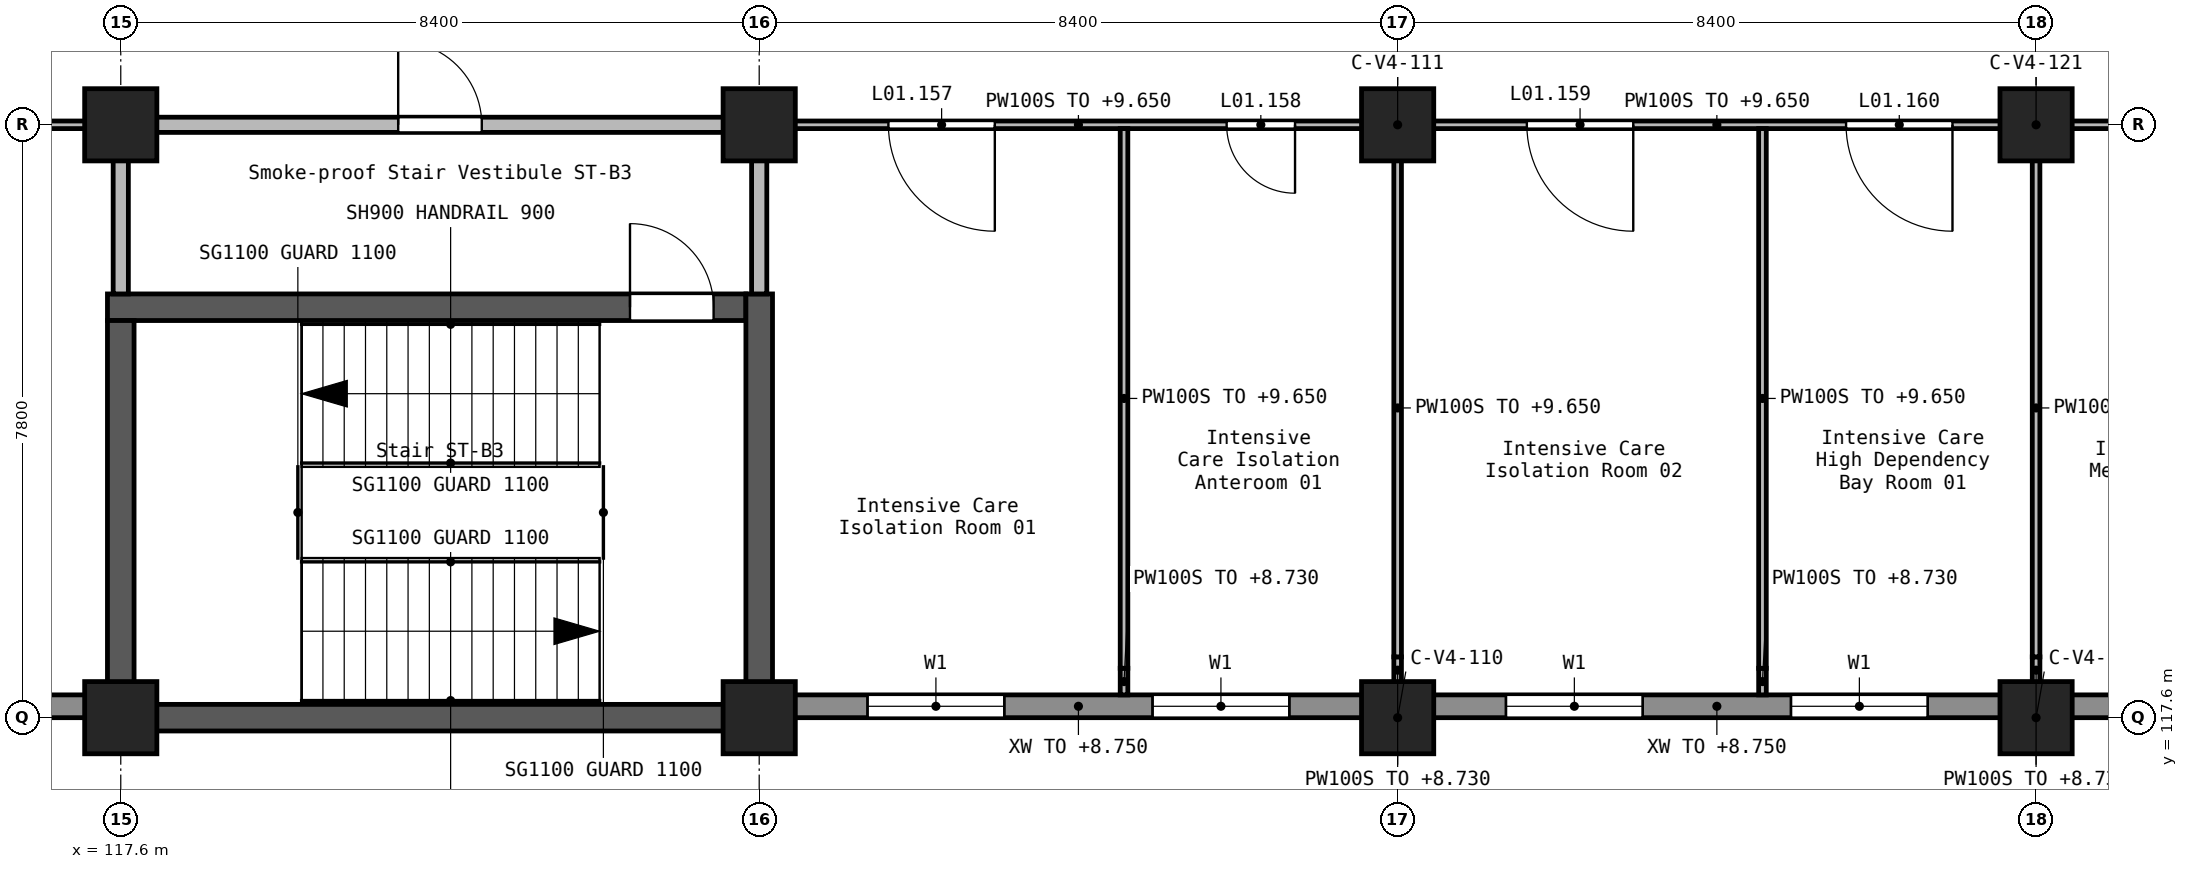
"""IFC4 building model, lengths in metres.
Left out: names, types, materials, properties, quantities, classifications, styles, units other than length and angle.
Written with IfcOpenShell. Run it as: python <this file> out.ifc"""

import sys

from ifc_helpers import new_model, si_unit, direction, frame, frame_2d, origin, origin_2d, place, context, subcontext, project, spatial, rectangle, extrude, element, fill, save


model = new_model("IFC4")
c1 = context("Model", 3, precision=1e-05, world=origin(), true_north=direction((0.0, 1.0)))
c2 = subcontext(c1, "Body", "Model", "MODEL_VIEW")
j1 = project(units=[si_unit("LENGTHUNIT", "METRE"), si_unit("PLANEANGLEUNIT", "RADIAN")], contexts=[c1])
p1 = place(None, origin())
s1 = spatial("IfcSite", under=j1, at=p1, CompositionType="ELEMENT")
p2 = place(p1, origin())
s2 = spatial("IfcBuilding", under=s1, at=p2, CompositionType="ELEMENT")
p3 = place(p2, frame((0.0, 0.0, 5.4)))
s3 = spatial("IfcBuildingStorey", under=s2, at=p3, CompositionType="ELEMENT", Elevation=5.4)
for number, where, z_axis, x_axis in (
    (1, (117.6, 117.6, 0.0), (0.0, 0.0, 1.0), (1.0, 0.0, 0.0)),
    (2, (117.6, 125.4, 0.0), (0.0, 0.0, 1.0), (1.0, 0.0, 0.0)),
    (3, (126.0, 117.6, 0.0), (0.0, 0.0, 1.0), (1.0, 0.0, 0.0)),
    (4, (126.0, 125.4, 0.0), (0.0, 0.0, 1.0), (1.0, 0.0, 0.0)),
    (5, (134.4, 117.6, 0.0), (0.0, 0.0, 1.0), (1.0, 0.0, 0.0)),
    (6, (134.4, 125.4, 0.0), (0.0, 0.0, 1.0), (1.0, 0.0, 0.0)),
    (7, (142.8, 117.6, 0.0), (0.0, 0.0, 1.0), (1.0, 0.0, 0.0)),
    (8, (142.8, 125.4, 0.0), (0.0, 0.0, 1.0), (1.0, 0.0, 0.0)),
):
    element("IfcColumn", number, at=place(p3, frame(where, z_axis=z_axis, x_axis=x_axis)), inside=s3, PredefinedType="COLUMN", context=c2, shape_type="SweptSolid", body=[
        extrude(rectangle(XDim=0.95, YDim=0.95, at=origin_2d()), origin(), (0.0, 0.0, 1.0), 4.5),
    ])
p4 = place(p3, frame((117.425, 123.0, 0.0), z_axis=(0.0, 0.0, 1.0), x_axis=(1.0, 0.0, 0.0)))
e9 = element("IfcWall", 9, at=p4, inside=s3, PredefinedType="SHEAR", context=c2, shape_type="SweptSolid", body=[
    extrude(rectangle(XDim=8.4, YDim=0.35, at=frame_2d((4.2, 0.0))), origin(), (0.0, 0.0, 1.0), 4.5),
])
p5 = place(p4, frame((6.875, 0.0, 0.0)))
e10 = element("IfcOpeningElement", 10, at=p5, cuts=e9, PredefinedType="OPENING", context=c2, shape_type="SweptSolid", body=[
    extrude(rectangle(XDim=1.1, YDim=2.1, at=frame_2d((0.55, 1.05))), frame((0.0, 0.185, 0.0), z_axis=(0.0, -1.0, 0.0), x_axis=(1.0, 0.0, 0.0)), (0.0, 0.0, 1.0), 0.37),
])
p6 = place(p3, frame((117.6, 117.425, 0.0), z_axis=(0.0, 0.0, 1.0), x_axis=(0.0, 1.0, 0.0)))
e11 = element("IfcWall", 11, at=p6, inside=s3, PredefinedType="SHEAR", context=c2, shape_type="SweptSolid", body=[
    extrude(rectangle(XDim=5.4, YDim=0.35, at=frame_2d((2.7, 0.0))), origin(), (0.0, 0.0, 1.0), 4.5),
])
p7 = place(p3, frame((117.775, 117.6, 0.0), z_axis=(0.0, 0.0, 1.0), x_axis=(1.0, 0.0, 0.0)))
e12 = element("IfcWall", 12, at=p7, inside=s3, PredefinedType="SHEAR", context=c2, shape_type="SweptSolid", body=[
    extrude(rectangle(XDim=8.05, YDim=0.35, at=frame_2d((4.025, 0.0))), origin(), (0.0, 0.0, 1.0), 4.5),
])
p8 = place(p3, frame((126.0, 117.425, 0.0), z_axis=(0.0, 0.0, 1.0), x_axis=(0.0, 1.0, 0.0)))
e13 = element("IfcWall", 13, at=p8, inside=s3, PredefinedType="SHEAR", context=c2, shape_type="SweptSolid", body=[
    extrude(rectangle(XDim=5.75, YDim=0.35, at=frame_2d((2.875, 0.0))), origin(), (0.0, 0.0, 1.0), 4.5),
])
p9 = place(p3, frame((109.65, 117.75, 0.0), z_axis=(0.0, 0.0, 1.0), x_axis=(1.0, 0.0, 0.0)))
e14 = element("IfcWall", 14, at=p9, inside=s3, PredefinedType="STANDARD", context=c2, shape_type="SweptSolid", body=[
    extrude(rectangle(XDim=7.5, YDim=0.3, at=frame_2d((3.75, 0.0))), origin(), (0.0, 0.0, 1.0), 3.35),
])
p10 = place(p9, frame((0.975, 0.0, 0.9)))
e15 = element("IfcOpeningElement", 15, at=p10, cuts=e14, PredefinedType="OPENING", context=c2, shape_type="SweptSolid", body=[
    extrude(rectangle(XDim=1.8, YDim=1.5, at=frame_2d((0.9, 0.75))), frame((0.0, 0.16, 0.0), z_axis=(0.0, -1.0, 0.0), x_axis=(1.0, 0.0, 0.0)), (0.0, 0.0, 1.0), 0.32),
])
p11 = place(p9, frame((4.725, 0.0, 0.9)))
e16 = element("IfcOpeningElement", 16, at=p11, cuts=e14, PredefinedType="OPENING", context=c2, shape_type="SweptSolid", body=[
    extrude(rectangle(XDim=1.8, YDim=1.5, at=frame_2d((0.9, 0.75))), frame((0.0, 0.16, 0.0), z_axis=(0.0, -1.0, 0.0), x_axis=(1.0, 0.0, 0.0)), (0.0, 0.0, 1.0), 0.32),
])
p12 = place(p3, frame((126.45, 117.75, 0.0), z_axis=(0.0, 0.0, 1.0), x_axis=(1.0, 0.0, 0.0)))
e17 = element("IfcWall", 17, at=p12, inside=s3, PredefinedType="STANDARD", context=c2, shape_type="SweptSolid", body=[
    extrude(rectangle(XDim=7.5, YDim=0.3, at=frame_2d((3.75, 0.0))), origin(), (0.0, 0.0, 1.0), 3.35),
])
p13 = place(p12, frame((0.975, 0.0, 0.9)))
e18 = element("IfcOpeningElement", 18, at=p13, cuts=e17, PredefinedType="OPENING", context=c2, shape_type="SweptSolid", body=[
    extrude(rectangle(XDim=1.8, YDim=1.5, at=frame_2d((0.9, 0.75))), frame((0.0, 0.16, 0.0), z_axis=(0.0, -1.0, 0.0), x_axis=(1.0, 0.0, 0.0)), (0.0, 0.0, 1.0), 0.32),
])
p14 = place(p12, frame((4.725, 0.0, 0.9)))
e19 = element("IfcOpeningElement", 19, at=p14, cuts=e17, PredefinedType="OPENING", context=c2, shape_type="SweptSolid", body=[
    extrude(rectangle(XDim=1.8, YDim=1.5, at=frame_2d((0.9, 0.75))), frame((0.0, 0.16, 0.0), z_axis=(0.0, -1.0, 0.0), x_axis=(1.0, 0.0, 0.0)), (0.0, 0.0, 1.0), 0.32),
])
p15 = place(p3, frame((134.85, 117.75, 0.0), z_axis=(0.0, 0.0, 1.0), x_axis=(1.0, 0.0, 0.0)))
e20 = element("IfcWall", 20, at=p15, inside=s3, PredefinedType="STANDARD", context=c2, shape_type="SweptSolid", body=[
    extrude(rectangle(XDim=7.5, YDim=0.3, at=frame_2d((3.75, 0.0))), origin(), (0.0, 0.0, 1.0), 3.35),
])
p16 = place(p15, frame((0.975, 0.0, 0.9)))
e21 = element("IfcOpeningElement", 21, at=p16, cuts=e20, PredefinedType="OPENING", context=c2, shape_type="SweptSolid", body=[
    extrude(rectangle(XDim=1.8, YDim=1.5, at=frame_2d((0.9, 0.75))), frame((0.0, 0.16, 0.0), z_axis=(0.0, -1.0, 0.0), x_axis=(1.0, 0.0, 0.0)), (0.0, 0.0, 1.0), 0.32),
])
p17 = place(p15, frame((4.725, 0.0, 0.9)))
e22 = element("IfcOpeningElement", 22, at=p17, cuts=e20, PredefinedType="OPENING", context=c2, shape_type="SweptSolid", body=[
    extrude(rectangle(XDim=1.8, YDim=1.5, at=frame_2d((0.9, 0.75))), frame((0.0, 0.16, 0.0), z_axis=(0.0, -1.0, 0.0), x_axis=(1.0, 0.0, 0.0)), (0.0, 0.0, 1.0), 0.32),
])
p18 = place(p3, frame((143.25, 117.75, 0.0), z_axis=(0.0, 0.0, 1.0), x_axis=(1.0, 0.0, 0.0)))
e23 = element("IfcWall", 23, at=p18, inside=s3, PredefinedType="STANDARD", context=c2, shape_type="SweptSolid", body=[
    extrude(rectangle(XDim=7.5, YDim=0.3, at=frame_2d((3.75, 0.0))), origin(), (0.0, 0.0, 1.0), 3.35),
])
p19 = place(p18, frame((0.975, 0.0, 0.9)))
e24 = element("IfcOpeningElement", 24, at=p19, cuts=e23, PredefinedType="OPENING", context=c2, shape_type="SweptSolid", body=[
    extrude(rectangle(XDim=1.8, YDim=1.5, at=frame_2d((0.9, 0.75))), frame((0.0, 0.16, 0.0), z_axis=(0.0, -1.0, 0.0), x_axis=(1.0, 0.0, 0.0)), (0.0, 0.0, 1.0), 0.32),
])
p20 = place(p18, frame((4.725, 0.0, 0.9)))
e25 = element("IfcOpeningElement", 25, at=p20, cuts=e23, PredefinedType="OPENING", context=c2, shape_type="SweptSolid", body=[
    extrude(rectangle(XDim=1.8, YDim=1.5, at=frame_2d((0.9, 0.75))), frame((0.0, 0.16, 0.0), z_axis=(0.0, -1.0, 0.0), x_axis=(1.0, 0.0, 0.0)), (0.0, 0.0, 1.0), 0.32),
])
p21 = place(p3, frame((118.05, 125.4, 0.0), z_axis=(0.0, 0.0, 1.0), x_axis=(1.0, 0.0, 0.0)))
e26 = element("IfcWall", 26, at=p21, inside=s3, PredefinedType="SOLIDWALL", context=c2, shape_type="SweptSolid", body=[
    extrude(rectangle(XDim=7.5, YDim=0.2, at=frame_2d((3.75, 0.0))), origin(), (0.0, 0.0, 1.0), 4.25),
])
p22 = place(p21, frame((3.2, 0.0, 0.0)))
e27 = element("IfcOpeningElement", 27, at=p22, cuts=e26, PredefinedType="OPENING", context=c2, shape_type="SweptSolid", body=[
    extrude(rectangle(XDim=1.1, YDim=2.1, at=frame_2d((0.55, 1.05))), frame((0.0, 0.11, 0.0), z_axis=(0.0, -1.0, 0.0), x_axis=(1.0, 0.0, 0.0)), (0.0, 0.0, 1.0), 0.22),
])
for number, where, z_axis, x_axis in (
    (28, (117.6, 123.175, 0.0), (0.0, 0.0, 1.0), (0.0, 1.0, 0.0)),
    (29, (126.0, 123.175, 0.0), (0.0, 0.0, 1.0), (0.0, 1.0, 0.0)),
):
    element("IfcWall", number, at=place(p3, frame(where, z_axis=z_axis, x_axis=x_axis)), inside=s3, PredefinedType="SOLIDWALL", context=c2, shape_type="SweptSolid", body=[
        extrude(rectangle(XDim=1.775, YDim=0.2, at=frame_2d((0.887, 0.0))), origin(), (0.0, 0.0, 1.0), 4.25),
    ])
p23 = place(p3, frame((150.75, 125.4, 0.0), z_axis=(0.0, 0.0, 1.0), x_axis=(-1.0, 0.0, 0.0)))
e30 = element("IfcWall", 30, at=p23, inside=s3, PredefinedType="PARTITIONING", context=c2, shape_type="SweptSolid", body=[
    extrude(rectangle(XDim=7.5, YDim=0.1, at=frame_2d((3.75, 0.0))), origin(), (0.0, 0.0, 1.0), 4.25),
])
p24 = place(p23, frame((5.7, 0.0, 0.0)))
e31 = element("IfcOpeningElement", 31, at=p24, cuts=e30, PredefinedType="OPENING", context=c2, shape_type="SweptSolid", body=[
    extrude(rectangle(XDim=0.9, YDim=2.1, at=frame_2d((0.45, 1.05))), frame((0.0, 0.06, 0.0), z_axis=(0.0, -1.0, 0.0), x_axis=(1.0, 0.0, 0.0)), (0.0, 0.0, 1.0), 0.12),
])
p25 = place(p23, frame((1.25, 0.0, 0.0)))
e32 = element("IfcOpeningElement", 32, at=p25, cuts=e30, PredefinedType="OPENING", context=c2, shape_type="SweptSolid", body=[
    extrude(rectangle(XDim=1.4, YDim=2.1, at=frame_2d((0.7, 1.05))), frame((0.0, 0.06, 0.0), z_axis=(0.0, -1.0, 0.0), x_axis=(1.0, 0.0, 0.0)), (0.0, 0.0, 1.0), 0.12),
])
p26 = place(p3, frame((142.35, 125.4, 0.0), z_axis=(0.0, 0.0, 1.0), x_axis=(-1.0, 0.0, 0.0)))
e33 = element("IfcWall", 33, at=p26, inside=s3, PredefinedType="PARTITIONING", context=c2, shape_type="SweptSolid", body=[
    extrude(rectangle(XDim=7.5, YDim=0.1, at=frame_2d((3.75, 0.0))), origin(), (0.0, 0.0, 1.0), 4.25),
])
p27 = place(p26, frame((4.85, 0.0, 0.0)))
e34 = element("IfcOpeningElement", 34, at=p27, cuts=e33, PredefinedType="OPENING", context=c2, shape_type="SweptSolid", body=[
    extrude(rectangle(XDim=1.4, YDim=2.1, at=frame_2d((0.7, 1.05))), frame((0.0, 0.06, 0.0), z_axis=(0.0, -1.0, 0.0), x_axis=(1.0, 0.0, 0.0)), (0.0, 0.0, 1.0), 0.12),
])
p28 = place(p26, frame((0.65, 0.0, 0.0)))
e35 = element("IfcOpeningElement", 35, at=p28, cuts=e33, PredefinedType="OPENING", context=c2, shape_type="SweptSolid", body=[
    extrude(rectangle(XDim=1.4, YDim=2.1, at=frame_2d((0.7, 1.05))), frame((0.0, 0.06, 0.0), z_axis=(0.0, -1.0, 0.0), x_axis=(1.0, 0.0, 0.0)), (0.0, 0.0, 1.0), 0.12),
])
p29 = place(p3, frame((133.95, 125.4, 0.0), z_axis=(0.0, 0.0, 1.0), x_axis=(-1.0, 0.0, 0.0)))
e36 = element("IfcWall", 36, at=p29, inside=s3, PredefinedType="PARTITIONING", context=c2, shape_type="SweptSolid", body=[
    extrude(rectangle(XDim=7.5, YDim=0.1, at=frame_2d((3.75, 0.0))), origin(), (0.0, 0.0, 1.0), 4.25),
])
p30 = place(p29, frame((4.85, 0.0, 0.0)))
e37 = element("IfcOpeningElement", 37, at=p30, cuts=e36, PredefinedType="OPENING", context=c2, shape_type="SweptSolid", body=[
    extrude(rectangle(XDim=1.4, YDim=2.1, at=frame_2d((0.7, 1.05))), frame((0.0, 0.06, 0.0), z_axis=(0.0, -1.0, 0.0), x_axis=(1.0, 0.0, 0.0)), (0.0, 0.0, 1.0), 0.12),
])
p31 = place(p29, frame((0.9, 0.0, 0.0)))
e38 = element("IfcOpeningElement", 38, at=p31, cuts=e36, PredefinedType="OPENING", context=c2, shape_type="SweptSolid", body=[
    extrude(rectangle(XDim=0.9, YDim=2.1, at=frame_2d((0.45, 1.05))), frame((0.0, 0.06, 0.0), z_axis=(0.0, -1.0, 0.0), x_axis=(1.0, 0.0, 0.0)), (0.0, 0.0, 1.0), 0.12),
])
p32 = place(p3, frame((117.15, 125.4, 0.0), z_axis=(0.0, 0.0, 1.0), x_axis=(-1.0, 0.0, 0.0)))
e39 = element("IfcWall", 39, at=p32, inside=s3, PredefinedType="PARTITIONING", context=c2, shape_type="SweptSolid", body=[
    extrude(rectangle(XDim=7.5, YDim=0.1, at=frame_2d((3.75, 0.0))), origin(), (0.0, 0.0, 1.0), 4.25),
])
p33 = place(p32, frame((5.701, 0.0, 0.0)))
e40 = element("IfcOpeningElement", 40, at=p33, cuts=e39, PredefinedType="OPENING", context=c2, shape_type="SweptSolid", body=[
    extrude(rectangle(XDim=0.9, YDim=2.1, at=frame_2d((0.45, 1.05))), frame((0.0, 0.06, 0.0), z_axis=(0.0, -1.0, 0.0), x_axis=(1.0, 0.0, 0.0)), (0.0, 0.0, 1.0), 0.12),
])
p34 = place(p32, frame((1.252, 0.0, 0.0)))
e41 = element("IfcOpeningElement", 41, at=p34, cuts=e39, PredefinedType="OPENING", context=c2, shape_type="SweptSolid", body=[
    extrude(rectangle(XDim=1.4, YDim=2.1, at=frame_2d((0.7, 1.05))), frame((0.0, 0.06, 0.0), z_axis=(0.0, -1.0, 0.0), x_axis=(1.0, 0.0, 0.0)), (0.0, 0.0, 1.0), 0.12),
])
p35 = place(p3, frame((130.8, 117.9, 0.0), z_axis=(0.0, 0.0, 1.0), x_axis=(0.0, 1.0, 0.0)))
e42 = element("IfcWall", 42, at=p35, inside=s3, PredefinedType="PARTITIONING", context=c2, shape_type="SweptSolid", body=[
    extrude(rectangle(XDim=0.35, YDim=0.1, at=frame_2d((0.175, 0.0))), origin(), (0.0, 0.0, 1.0), 3.33),
])
p36 = place(p3, frame((130.8, 118.25, 0.0), z_axis=(0.0, 0.0, 1.0), x_axis=(0.0, 1.0, 0.0)))
e43 = element("IfcWall", 43, at=p36, inside=s3, PredefinedType="PARTITIONING", context=c2, shape_type="SweptSolid", body=[
    extrude(rectangle(XDim=7.1, YDim=0.1, at=frame_2d((3.55, 0.0))), origin(), (0.0, 0.0, 1.0), 4.25),
])
p37 = place(p3, frame((134.4, 118.05, 0.0), z_axis=(0.0, 0.0, 1.0), x_axis=(0.0, 1.0, 0.0)))
e44 = element("IfcWall", 44, at=p37, inside=s3, PredefinedType="PARTITIONING", context=c2, shape_type="SweptSolid", body=[
    extrude(rectangle(XDim=0.35, YDim=0.1, at=frame_2d((0.175, 0.0))), origin(), (0.0, 0.0, 1.0), 3.33),
])
p38 = place(p3, frame((134.4, 118.4, 0.0), z_axis=(0.0, 0.0, 1.0), x_axis=(0.0, 1.0, 0.0)))
e45 = element("IfcWall", 45, at=p38, inside=s3, PredefinedType="PARTITIONING", context=c2, shape_type="SweptSolid", body=[
    extrude(rectangle(XDim=6.55, YDim=0.1, at=frame_2d((3.275, 0.0))), origin(), (0.0, 0.0, 1.0), 4.25),
])
p39 = place(p3, frame((139.2, 117.9, 0.0), z_axis=(0.0, 0.0, 1.0), x_axis=(0.0, 1.0, 0.0)))
e46 = element("IfcWall", 46, at=p39, inside=s3, PredefinedType="PARTITIONING", context=c2, shape_type="SweptSolid", body=[
    extrude(rectangle(XDim=0.35, YDim=0.1, at=frame_2d((0.175, 0.0))), origin(), (0.0, 0.0, 1.0), 3.33),
])
p40 = place(p3, frame((139.2, 118.25, 0.0), z_axis=(0.0, 0.0, 1.0), x_axis=(0.0, 1.0, 0.0)))
e47 = element("IfcWall", 47, at=p40, inside=s3, PredefinedType="PARTITIONING", context=c2, shape_type="SweptSolid", body=[
    extrude(rectangle(XDim=7.1, YDim=0.1, at=frame_2d((3.55, 0.0))), origin(), (0.0, 0.0, 1.0), 4.25),
])
p41 = place(p3, frame((142.8, 118.05, 0.0), z_axis=(0.0, 0.0, 1.0), x_axis=(0.0, 1.0, 0.0)))
e48 = element("IfcWall", 48, at=p41, inside=s3, PredefinedType="PARTITIONING", context=c2, shape_type="SweptSolid", body=[
    extrude(rectangle(XDim=0.35, YDim=0.1, at=frame_2d((0.175, 0.0))), origin(), (0.0, 0.0, 1.0), 3.33),
])
p42 = place(p3, frame((142.8, 118.4, 0.0), z_axis=(0.0, 0.0, 1.0), x_axis=(0.0, 1.0, 0.0)))
e49 = element("IfcWall", 49, at=p42, inside=s3, PredefinedType="PARTITIONING", context=c2, shape_type="SweptSolid", body=[
    extrude(rectangle(XDim=6.55, YDim=0.1, at=frame_2d((3.275, 0.0))), origin(), (0.0, 0.0, 1.0), 4.25),
])
p43 = place(p13, origin())
e50 = element("IfcWindow", 50, at=p43, inside=s3, PartitioningType="SINGLE_PANEL", PredefinedType="WINDOW", context=c2, shape_type="SweptSolid", body=[
    extrude(rectangle(XDim=1.8, YDim=1.5, at=frame_2d((0.9, 0.75))), frame((0.0, 0.03, 0.0), z_axis=(0.0, -1.0, 0.0), x_axis=(1.0, 0.0, 0.0)), (0.0, 0.0, 1.0), 0.06),
])
fill(e18, e50)
p44 = place(p14, origin())
e51 = element("IfcWindow", 51, at=p44, inside=s3, PartitioningType="SINGLE_PANEL", PredefinedType="WINDOW", context=c2, shape_type="SweptSolid", body=[
    extrude(rectangle(XDim=1.8, YDim=1.5, at=frame_2d((0.9, 0.75))), frame((0.0, 0.03, 0.0), z_axis=(0.0, -1.0, 0.0), x_axis=(1.0, 0.0, 0.0)), (0.0, 0.0, 1.0), 0.06),
])
fill(e19, e51)
p45 = place(p16, origin())
e52 = element("IfcWindow", 52, at=p45, inside=s3, PartitioningType="SINGLE_PANEL", PredefinedType="WINDOW", context=c2, shape_type="SweptSolid", body=[
    extrude(rectangle(XDim=1.8, YDim=1.5, at=frame_2d((0.9, 0.75))), frame((0.0, 0.03, 0.0), z_axis=(0.0, -1.0, 0.0), x_axis=(1.0, 0.0, 0.0)), (0.0, 0.0, 1.0), 0.06),
])
fill(e21, e52)
p46 = place(p17, origin())
e53 = element("IfcWindow", 53, at=p46, inside=s3, PartitioningType="SINGLE_PANEL", PredefinedType="WINDOW", context=c2, shape_type="SweptSolid", body=[
    extrude(rectangle(XDim=1.8, YDim=1.5, at=frame_2d((0.9, 0.75))), frame((0.0, 0.03, 0.0), z_axis=(0.0, -1.0, 0.0), x_axis=(1.0, 0.0, 0.0)), (0.0, 0.0, 1.0), 0.06),
])
fill(e22, e53)
p47 = place(p5, frame((1.1, 0.0, 0.0), z_axis=(0.0, 0.0, 1.0), x_axis=(-1.0, 0.0, 0.0)))
e54 = element("IfcDoor", 54, at=p47, inside=s3, OperationType="SINGLE_SWING_LEFT", PredefinedType="DOOR", context=c2, shape_type="SweptSolid", body=[
    extrude(rectangle(XDim=1.1, YDim=2.1, at=frame_2d((0.55, 1.05))), frame((0.0, 0.025, 0.0), z_axis=(0.0, -1.0, 0.0), x_axis=(1.0, 0.0, 0.0)), (0.0, 0.0, 1.0), 0.05),
])
fill(e10, e54)
p48 = place(p22, frame((1.1, 0.0, 0.0), z_axis=(0.0, 0.0, 1.0), x_axis=(-1.0, 0.0, 0.0)))
e55 = element("IfcDoor", 55, at=p48, inside=s3, OperationType="SINGLE_SWING_LEFT", PredefinedType="DOOR", context=c2, shape_type="SweptSolid", body=[
    extrude(rectangle(XDim=1.1, YDim=2.1, at=frame_2d((0.55, 1.05))), frame((0.0, 0.025, 0.0), z_axis=(0.0, -1.0, 0.0), x_axis=(1.0, 0.0, 0.0)), (0.0, 0.0, 1.0), 0.05),
])
fill(e27, e55)
p49 = place(p30, origin())
e56 = element("IfcDoor", 56, at=p49, inside=s3, OperationType="DOUBLE_DOOR_SINGLE_SWING", PredefinedType="DOOR", context=c2, shape_type="SweptSolid", body=[
    extrude(rectangle(XDim=1.4, YDim=2.1, at=frame_2d((0.7, 1.05))), frame((0.0, 0.025, 0.0), z_axis=(0.0, -1.0, 0.0), x_axis=(1.0, 0.0, 0.0)), (0.0, 0.0, 1.0), 0.05),
])
fill(e37, e56)
p50 = place(p31, origin())
e57 = element("IfcDoor", 57, at=p50, inside=s3, OperationType="SINGLE_SWING_LEFT", PredefinedType="DOOR", context=c2, shape_type="SweptSolid", body=[
    extrude(rectangle(XDim=0.9, YDim=2.1, at=frame_2d((0.45, 1.05))), frame((0.0, 0.025, 0.0), z_axis=(0.0, -1.0, 0.0), x_axis=(1.0, 0.0, 0.0)), (0.0, 0.0, 1.0), 0.05),
])
fill(e38, e57)
p51 = place(p27, origin())
e58 = element("IfcDoor", 58, at=p51, inside=s3, OperationType="DOUBLE_DOOR_SINGLE_SWING", PredefinedType="DOOR", context=c2, shape_type="SweptSolid", body=[
    extrude(rectangle(XDim=1.4, YDim=2.1, at=frame_2d((0.7, 1.05))), frame((0.0, 0.025, 0.0), z_axis=(0.0, -1.0, 0.0), x_axis=(1.0, 0.0, 0.0)), (0.0, 0.0, 1.0), 0.05),
])
fill(e34, e58)
p52 = place(p28, origin())
e59 = element("IfcDoor", 59, at=p52, inside=s3, OperationType="DOUBLE_DOOR_SINGLE_SWING", PredefinedType="DOOR", context=c2, shape_type="SweptSolid", body=[
    extrude(rectangle(XDim=1.4, YDim=2.1, at=frame_2d((0.7, 1.05))), frame((0.0, 0.025, 0.0), z_axis=(0.0, -1.0, 0.0), x_axis=(1.0, 0.0, 0.0)), (0.0, 0.0, 1.0), 0.05),
])
fill(e35, e59)
save(model, sys.argv[1])
